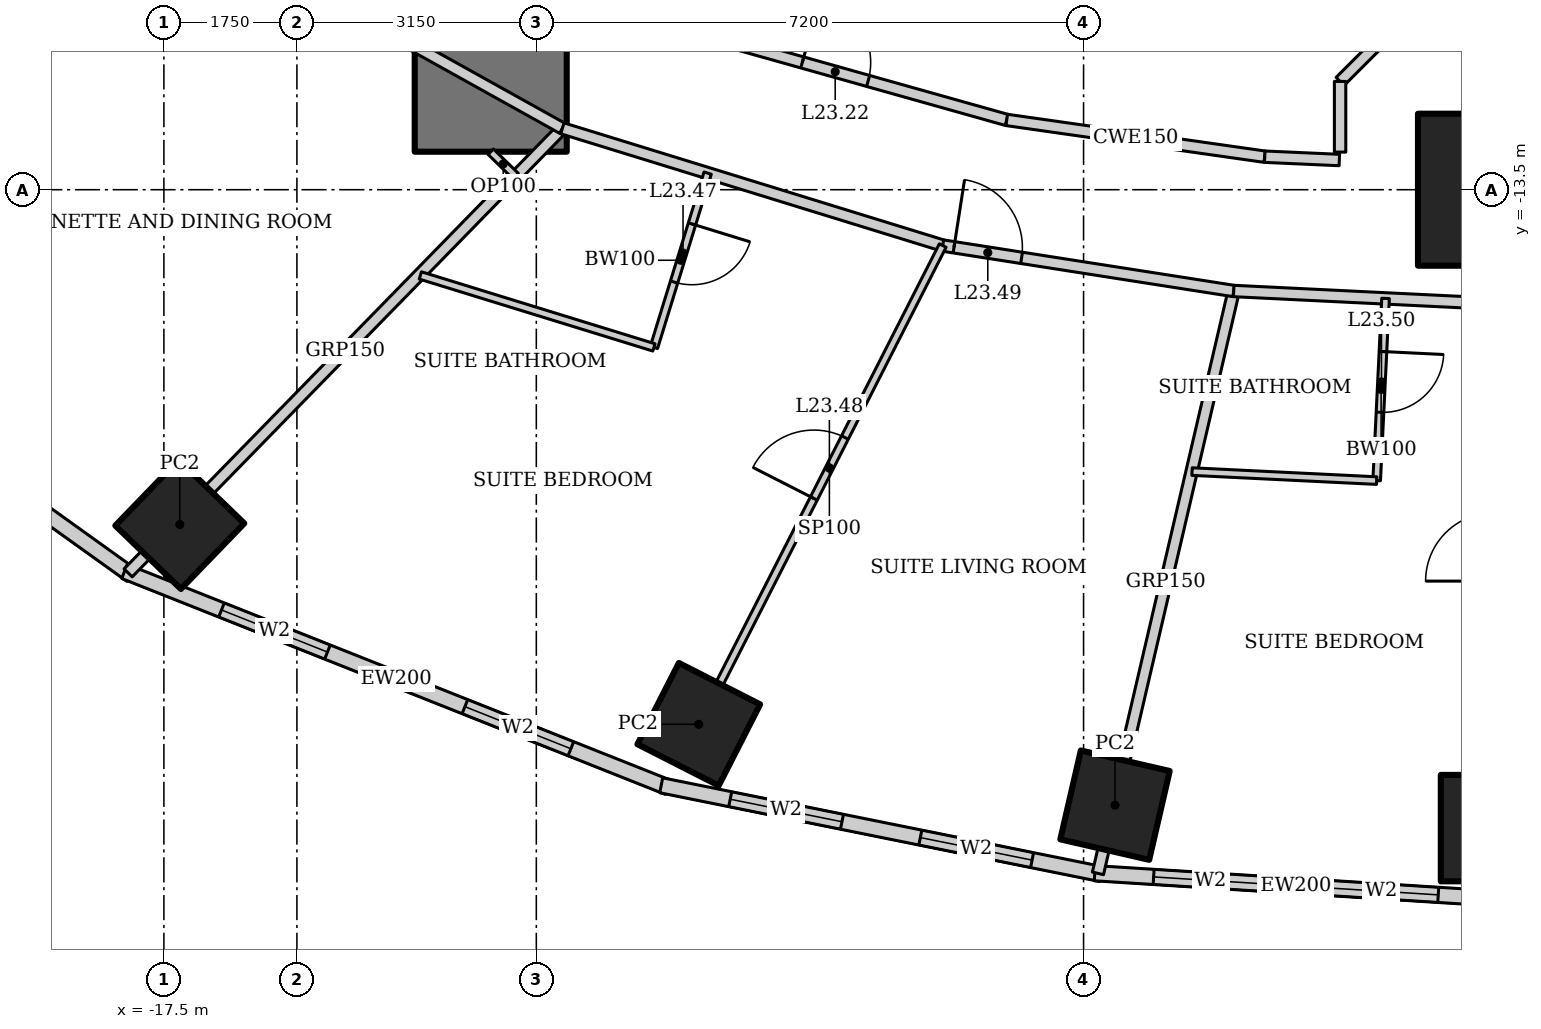
"""IFC4 building model, lengths in metres.
Left out: names, types, materials, properties, quantities, classifications, styles, units other than length and angle.
Written with IfcOpenShell. Run it as: python <this file> out.ifc"""

import sys

from ifc_helpers import new_model, si_unit, direction, frame, frame_2d, origin, origin_2d, place, context, subcontext, project, spatial, rectangle, hollow_rectangle, extrude, element, fill, save


model = new_model("IFC4")
c1 = context("Model", 3, precision=1e-05, world=origin(), true_north=direction((0.0, 1.0)))
c2 = subcontext(c1, "Body", "Model", "MODEL_VIEW")
j1 = project(units=[si_unit("LENGTHUNIT", "METRE"), si_unit("PLANEANGLEUNIT", "RADIAN")], contexts=[c1])
p1 = place(None, origin())
s1 = spatial("IfcSite", under=j1, at=p1, CompositionType="ELEMENT")
p2 = place(p1, origin())
s2 = spatial("IfcBuilding", under=s1, at=p2, CompositionType="ELEMENT")
p3 = place(p2, frame((0.0, 0.0, 98.2)))
s3 = spatial("IfcBuildingStorey", under=s2, at=p3, CompositionType="ELEMENT", Elevation=98.2)
p4 = place(p3, frame((0.0, -13.5, 0.0), z_axis=(0.0, 0.0, 1.0), x_axis=(1.0, 0.0, 0.0)))
e1 = element("IfcColumn", 1, at=p4, inside=s3, PredefinedType="COLUMN", context=c2, shape_type="SweptSolid", body=[
    extrude(hollow_rectangle(XDim=2.0, YDim=2.0, WallThickness=0.17, at=origin_2d()), origin(), (0.0, 0.0, 1.0), 3.6),
])
for number, where, z_axis, x_axis in (
    (2, (-17.291, -17.905, 0.0), (0.0, 0.0, 1.0), (0.695, 0.719, 0.0)),
    (3, (-10.463, -20.534, 0.0), (0.0, 0.0, 1.0), (0.454, 0.891, 0.0)),
    (4, (-4.986, -21.598, 0.0), (0.0, 0.0, 1.0), (0.225, 0.974, 0.0)),
):
    element("IfcColumn", number, at=place(p3, frame(where, z_axis=z_axis, x_axis=x_axis)), inside=s3, PredefinedType="COLUMN", context=c2, shape_type="SweptSolid", body=[
        extrude(hollow_rectangle(XDim=1.2, YDim=1.2, WallThickness=0.1, at=origin_2d()), origin(), (0.0, 0.0, 1.0), 3.6),
    ])
p5 = place(p3, frame((0.0, -21.9, 0.0), z_axis=(0.0, 0.0, 1.0), x_axis=(1.0, 0.0, 0.0)))
e5 = element("IfcColumn", 5, at=p5, inside=s3, PredefinedType="COLUMN", context=c2, shape_type="SweptSolid", body=[
    extrude(hollow_rectangle(XDim=1.4, YDim=1.4, WallThickness=0.1, at=origin_2d()), origin(), (0.0, 0.0, 1.0), 3.6),
])
p6 = place(p3, frame((-13.2, 13.0, 0.0), z_axis=(0.0, 0.0, 1.0), x_axis=(0.0, -1.0, 0.0)))
e6 = element("IfcWall", 6, at=p6, inside=s3, PredefinedType="SHEAR", context=c2, shape_type="SweptSolid", body=[
    extrude(rectangle(XDim=26.0, YDim=2.0, at=frame_2d((13.0, 0.0))), origin(), (0.0, 0.0, 1.0), 3.6),
])
p7 = place(p6, frame((12.1, 0.0, 0.0)))
e7 = element("IfcOpeningElement", 7, at=p7, cuts=e6, PredefinedType="OPENING", context=c2, shape_type="SweptSolid", body=[
    extrude(rectangle(XDim=1.8, YDim=2.1, at=frame_2d((0.9, 1.05))), frame((0.0, 1.01, 0.0), z_axis=(0.0, -1.0, 0.0), x_axis=(1.0, 0.0, 0.0)), (0.0, 0.0, 1.0), 2.02),
])
p8 = place(p3, frame((-24.482, -13.875, 0.0), z_axis=(0.0, 0.0, 1.0), x_axis=(0.812791321576, -0.582554948112, 0.0)))
e8 = element("IfcWall", 8, at=p8, inside=s3, PredefinedType="SOLIDWALL", context=c2, shape_type="SweptSolid", body=[
    extrude(rectangle(XDim=8.063, YDim=0.2, at=frame_2d((4.032, 0.0))), origin(), (0.0, 0.0, 1.0), 3.45),
])
p9 = place(p8, frame((1.466, 0.0, 0.5)))
e9 = element("IfcOpeningElement", 9, at=p9, cuts=e8, PredefinedType="OPENING", context=c2, shape_type="SweptSolid", body=[
    extrude(rectangle(XDim=1.5, YDim=2.2, at=frame_2d((0.75, 1.1))), frame((0.0, 0.11, 0.0), z_axis=(0.0, -1.0, 0.0), x_axis=(1.0, 0.0, 0.0)), (0.0, 0.0, 1.0), 0.22),
])
p10 = place(p8, frame((5.097, 0.0, 0.5)))
e10 = element("IfcOpeningElement", 10, at=p10, cuts=e8, PredefinedType="OPENING", context=c2, shape_type="SweptSolid", body=[
    extrude(rectangle(XDim=1.5, YDim=2.2, at=frame_2d((0.75, 1.1))), frame((0.0, 0.11, 0.0), z_axis=(0.0, -1.0, 0.0), x_axis=(1.0, 0.0, 0.0)), (0.0, 0.0, 1.0), 0.22),
])
p11 = place(p3, frame((-18.018, -18.523, 0.0), z_axis=(0.0, 0.0, 1.0), x_axis=(0.929358351251, -0.369178892895, 0.0)))
e11 = element("IfcWall", 11, at=p11, inside=s3, PredefinedType="SOLIDWALL", context=c2, shape_type="SweptSolid", body=[
    extrude(rectangle(XDim=7.692, YDim=0.2, at=frame_2d((3.846, 0.0))), origin(), (0.0, 0.0, 1.0), 3.45),
])
p12 = place(p11, frame((1.373, 0.0, 0.5)))
e12 = element("IfcOpeningElement", 12, at=p12, cuts=e11, PredefinedType="OPENING", context=c2, shape_type="SweptSolid", body=[
    extrude(rectangle(XDim=1.5, YDim=2.2, at=frame_2d((0.75, 1.1))), frame((0.0, 0.11, 0.0), z_axis=(0.0, -1.0, 0.0), x_axis=(1.0, 0.0, 0.0)), (0.0, 0.0, 1.0), 0.22),
])
p13 = place(p11, frame((4.819, 0.0, 0.5)))
e13 = element("IfcOpeningElement", 13, at=p13, cuts=e11, PredefinedType="OPENING", context=c2, shape_type="SweptSolid", body=[
    extrude(rectangle(XDim=1.5, YDim=2.2, at=frame_2d((0.75, 1.1))), frame((0.0, 0.11, 0.0), z_axis=(0.0, -1.0, 0.0), x_axis=(1.0, 0.0, 0.0)), (0.0, 0.0, 1.0), 0.22),
])
p14 = place(p3, frame((-10.957, -21.337, 0.0), z_axis=(0.0, 0.0, 1.0), x_axis=(0.980251657452, -0.197754110105, 0.0)))
e14 = element("IfcWall", 14, at=p14, inside=s3, PredefinedType="SOLIDWALL", context=c2, shape_type="SweptSolid", body=[
    extrude(rectangle(XDim=5.904, YDim=0.2, at=frame_2d((2.952, 0.0))), origin(), (0.0, 0.0, 1.0), 3.45),
])
p15 = place(p14, frame((0.926, 0.0, 0.5)))
e15 = element("IfcOpeningElement", 15, at=p15, cuts=e14, PredefinedType="OPENING", context=c2, shape_type="SweptSolid", body=[
    extrude(rectangle(XDim=1.5, YDim=2.2, at=frame_2d((0.75, 1.1))), frame((0.0, 0.11, 0.0), z_axis=(0.0, -1.0, 0.0), x_axis=(1.0, 0.0, 0.0)), (0.0, 0.0, 1.0), 0.22),
])
p16 = place(p14, frame((3.478, 0.0, 0.5)))
e16 = element("IfcOpeningElement", 16, at=p16, cuts=e14, PredefinedType="OPENING", context=c2, shape_type="SweptSolid", body=[
    extrude(rectangle(XDim=1.5, YDim=2.2, at=frame_2d((0.75, 1.1))), frame((0.0, 0.11, 0.0), z_axis=(0.0, -1.0, 0.0), x_axis=(1.0, 0.0, 0.0)), (0.0, 0.0, 1.0), 0.22),
])
p17 = place(p3, frame((-5.253, -22.493, 0.0), z_axis=(0.0, 0.0, 1.0), x_axis=(0.998018582375, -0.062919863585, 0.0)))
e17 = element("IfcWall", 17, at=p17, inside=s3, PredefinedType="SOLIDWALL", context=c2, shape_type="SweptSolid", body=[
    extrude(rectangle(XDim=5.304, YDim=0.2, at=frame_2d((2.652, 0.0))), origin(), (0.0, 0.0, 1.0), 3.45),
])
p18 = place(p17, frame((0.776, 0.0, 0.5)))
e18 = element("IfcOpeningElement", 18, at=p18, cuts=e17, PredefinedType="OPENING", context=c2, shape_type="SweptSolid", body=[
    extrude(rectangle(XDim=1.5, YDim=2.2, at=frame_2d((0.75, 1.1))), frame((0.0, 0.11, 0.0), z_axis=(0.0, -1.0, 0.0), x_axis=(1.0, 0.0, 0.0)), (0.0, 0.0, 1.0), 0.22),
])
p19 = place(p17, frame((3.028, 0.0, 0.5)))
e19 = element("IfcOpeningElement", 19, at=p19, cuts=e17, PredefinedType="OPENING", context=c2, shape_type="SweptSolid", body=[
    extrude(rectangle(XDim=1.5, YDim=2.2, at=frame_2d((0.75, 1.1))), frame((0.0, 0.11, 0.0), z_axis=(0.0, -1.0, 0.0), x_axis=(1.0, 0.0, 0.0)), (0.0, 0.0, 1.0), 0.22),
])
p20 = place(p3, frame((-17.97, -18.542, 0.0), z_axis=(0.0, 0.0, 1.0), x_axis=(0.698757291878, 0.715358823981, 0.0)))
e20 = element("IfcWall", 20, at=p20, inside=s3, PredefinedType="PARTITIONING", context=c2, shape_type="SweptSolid", body=[
    extrude(rectangle(XDim=8.177, YDim=0.15, at=frame_2d((4.088, 0.0))), origin(), (0.0, 0.0, 1.0), 2.528),
])
p21 = place(p3, frame((-5.211, -22.496, 0.0), z_axis=(0.0, 0.0, 1.0), x_axis=(0.227056984461, 0.973881474209, 0.0)))
e21 = element("IfcWall", 21, at=p21, inside=s3, PredefinedType="PARTITIONING", context=c2, shape_type="SweptSolid", body=[
    extrude(rectangle(XDim=7.869, YDim=0.15, at=frame_2d((3.934, 0.0))), origin(), (0.0, 0.0, 1.0), 2.767),
])
p22 = place(p3, frame((-17.299, -9.885, 0.0), z_axis=(0.0, 0.0, 1.0), x_axis=(0.873695910579, -0.486472461541, 0.0)))
e22 = element("IfcWall", 22, at=p22, inside=s3, PredefinedType="PARTITIONING", context=c2, shape_type="SweptSolid", body=[
    extrude(rectangle(XDim=5.771, YDim=0.15, at=frame_2d((2.885, 0.0))), origin(), (0.0, 0.0, 1.0), 3.45),
])
p23 = place(p3, frame((-12.257, -12.693, 0.0), z_axis=(0.0, 0.0, 1.0), x_axis=(0.955657956744, -0.294478980085, 0.0)))
e23 = element("IfcWall", 23, at=p23, inside=s3, PredefinedType="PARTITIONING", context=c2, shape_type="SweptSolid", body=[
    extrude(rectangle(XDim=5.236, YDim=0.15, at=frame_2d((2.618, 0.0))), origin(), (0.0, 0.0, 1.0), 3.45),
])
p24 = place(p3, frame((-7.253, -14.235, 0.0), z_axis=(0.0, 0.0, 1.0), x_axis=(0.988015036573, -0.154357660987, 0.0)))
e24 = element("IfcWall", 24, at=p24, inside=s3, PredefinedType="PARTITIONING", context=c2, shape_type="SweptSolid", body=[
    extrude(rectangle(XDim=3.875, YDim=0.15, at=frame_2d((1.938, 0.0))), origin(), (0.0, 0.0, 1.0), 3.45),
])
p25 = place(p24, frame((0.15, 0.0, 0.0)))
e25 = element("IfcOpeningElement", 25, at=p25, cuts=e24, PredefinedType="OPENING", context=c2, shape_type="SweptSolid", body=[
    extrude(rectangle(XDim=0.9, YDim=2.1, at=frame_2d((0.45, 1.05))), frame((0.0, 0.085, 0.0), z_axis=(0.0, -1.0, 0.0), x_axis=(1.0, 0.0, 0.0)), (0.0, 0.0, 1.0), 0.17),
])
p26 = place(p3, frame((-3.424, -14.833, 0.0), z_axis=(0.0, 0.0, 1.0), x_axis=(0.998809560203, -0.048779733975, 0.0)))
e26 = element("IfcWall", 26, at=p26, inside=s3, PredefinedType="PARTITIONING", context=c2, shape_type="SweptSolid", body=[
    extrude(rectangle(XDim=3.428, YDim=0.15, at=frame_2d((1.714, 0.0))), origin(), (0.0, 0.0, 1.0), 3.45),
])
p27 = place(p3, frame((-10.924, -11.312, 0.0), z_axis=(0.0, 0.0, 1.0), x_axis=(0.962643729928, -0.270771211967, 0.0)))
e27 = element("IfcWall", 27, at=p27, inside=s3, PredefinedType="PARTITIONING", context=c2, shape_type="SweptSolid", body=[
    extrude(rectangle(XDim=4.688, YDim=0.15, at=frame_2d((2.344, 0.0))), origin(), (0.0, 0.0, 1.0), 3.45),
])
p28 = place(p27, frame((1.894, 0.0, 0.0)))
e28 = element("IfcOpeningElement", 28, at=p28, cuts=e27, PredefinedType="OPENING", context=c2, shape_type="SweptSolid", body=[
    extrude(rectangle(XDim=0.9, YDim=2.1, at=frame_2d((0.45, 1.05))), frame((0.0, 0.085, 0.0), z_axis=(0.0, -1.0, 0.0), x_axis=(1.0, 0.0, 0.0)), (0.0, 0.0, 1.0), 0.17),
])
p29 = place(p3, frame((-6.411, -12.582, 0.0), z_axis=(0.0, 0.0, 1.0), x_axis=(0.990002114939, -0.14105251652, 0.0)))
e29 = element("IfcWall", 29, at=p29, inside=s3, PredefinedType="PARTITIONING", context=c2, shape_type="SweptSolid", body=[
    extrude(rectangle(XDim=3.429, YDim=0.15, at=frame_2d((1.714, 0.0))), origin(), (0.0, 0.0, 1.0), 3.45),
])
p30 = place(p3, frame((-23.171, -13.24, 0.0), z_axis=(0.0, 0.0, 1.0), x_axis=(0.868249806728, 0.496127275118, 0.0)))
e30 = element("IfcWall", 30, at=p30, inside=s3, PredefinedType="PARTITIONING", context=c2, shape_type="SweptSolid", body=[
    extrude(rectangle(XDim=6.763, YDim=0.1, at=frame_2d((3.381, 0.0))), origin(), (0.0, 0.0, 1.0), 2.693),
])
p31 = place(p30, frame((2.931, 0.0, 0.0)))
e31 = element("IfcOpeningElement", 31, at=p31, cuts=e30, PredefinedType="OPENING", context=c2, shape_type="SweptSolid", body=[
    extrude(rectangle(XDim=0.9, YDim=2.1, at=frame_2d((0.45, 1.05))), frame((0.0, 0.06, 0.0), z_axis=(0.0, -1.0, 0.0), x_axis=(1.0, 0.0, 0.0)), (0.0, 0.0, 1.0), 0.12),
])
p32 = place(p3, frame((-10.346, -13.281, 0.0), z_axis=(0.0, 0.0, 1.0), x_axis=(-0.294478957423, -0.955657963727, 0.0)))
e32 = element("IfcWall", 32, at=p32, inside=s3, PredefinedType="PARTITIONING", context=c2, shape_type="SweptSolid", body=[
    extrude(rectangle(XDim=2.4, YDim=0.1, at=frame_2d((1.2, 0.0))), origin(), (0.0, 0.0, 1.0), 3.45),
])
p33 = place(p32, frame((0.7, 0.0, 0.0)))
e33 = element("IfcOpeningElement", 33, at=p33, cuts=e32, PredefinedType="OPENING", context=c2, shape_type="SweptSolid", body=[
    extrude(rectangle(XDim=0.8, YDim=2.1, at=frame_2d((0.4, 1.05))), frame((0.0, 0.06, 0.0), z_axis=(0.0, -1.0, 0.0), x_axis=(1.0, 0.0, 0.0)), (0.0, 0.0, 1.0), 0.12),
])
p34 = place(p3, frame((-11.052, -15.575, 0.0), z_axis=(0.0, 0.0, 1.0), x_axis=(-0.955641033268, 0.294533895391, 0.0)))
e34 = element("IfcWall", 34, at=p34, inside=s3, PredefinedType="PARTITIONING", context=c2, shape_type="SweptSolid", body=[
    extrude(rectangle(XDim=3.216, YDim=0.1, at=frame_2d((1.608, 0.0))), origin(), (0.0, 0.0, 1.0), 3.45),
])
p35 = place(p3, frame((-10.236, -20.088, 0.0), z_axis=(0.0, 0.0, 1.0), x_axis=(0.453993694696, 0.89100489627, 0.0)))
e35 = element("IfcWall", 35, at=p35, inside=s3, PredefinedType="PARTITIONING", context=c2, shape_type="SweptSolid", body=[
    extrude(rectangle(XDim=6.57, YDim=0.1, at=frame_2d((3.285, 0.0))), origin(), (0.0, 0.0, 1.0), 2.528),
])
p36 = place(p35, frame((2.835, 0.0, 0.0)))
e36 = element("IfcOpeningElement", 36, at=p36, cuts=e35, PredefinedType="OPENING", context=c2, shape_type="SweptSolid", body=[
    extrude(rectangle(XDim=0.9, YDim=2.1, at=frame_2d((0.45, 1.05))), frame((0.0, 0.06, 0.0), z_axis=(0.0, -1.0, 0.0), x_axis=(1.0, 0.0, 0.0)), (0.0, 0.0, 1.0), 0.12),
])
p37 = place(p3, frame((-1.427, -14.93, 0.0), z_axis=(0.0, 0.0, 1.0), x_axis=(-0.048831470304, -0.998807032168, 0.0)))
e37 = element("IfcWall", 37, at=p37, inside=s3, PredefinedType="PARTITIONING", context=c2, shape_type="SweptSolid", body=[
    extrude(rectangle(XDim=2.4, YDim=0.1, at=frame_2d((1.2, 0.0))), origin(), (0.0, 0.0, 1.0), 3.45),
])
p38 = place(p37, frame((0.7, 0.0, 0.0)))
e38 = element("IfcOpeningElement", 38, at=p38, cuts=e37, PredefinedType="OPENING", context=c2, shape_type="SweptSolid", body=[
    extrude(rectangle(XDim=0.8, YDim=2.1, at=frame_2d((0.4, 1.05))), frame((0.0, 0.06, 0.0), z_axis=(0.0, -1.0, 0.0), x_axis=(1.0, 0.0, 0.0)), (0.0, 0.0, 1.0), 0.12),
])
p39 = place(p3, frame((-1.544, -17.327, 0.0), z_axis=(0.0, 0.0, 1.0), x_axis=(-0.998813899717, 0.048690797202, 0.0)))
e39 = element("IfcWall", 39, at=p39, inside=s3, PredefinedType="PARTITIONING", context=c2, shape_type="SweptSolid", body=[
    extrude(rectangle(XDim=2.432, YDim=0.1, at=frame_2d((1.216, 0.0))), origin(), (0.0, 0.0, 1.0), 3.45),
])
p40 = place(p3, frame((-13.2, -13.0, 0.0), z_axis=(0.0, 0.0, 1.0), x_axis=(0.715289751842, -0.698827998087, 0.0)))
e40 = element("IfcWall", 40, at=p40, inside=s3, PredefinedType="PARTITIONING", context=c2, shape_type="SweptSolid", body=[
    extrude(rectangle(XDim=0.46, YDim=0.1, at=frame_2d((0.23, 0.0))), origin(), (0.0, 0.0, 1.0), 3.45),
])
p41 = place(p3, frame((-3.016, -13.066, 0.0), z_axis=(0.0, 0.0, 1.0), x_axis=(0.999010128674, -0.044483286824, 0.0)))
e41 = element("IfcWall", 41, at=p41, inside=s3, PredefinedType="PARTITIONING", context=c2, shape_type="SweptSolid", body=[
    extrude(rectangle(XDim=0.982, YDim=0.15, at=frame_2d((0.491, 0.0))), origin(), (0.0, 0.0, 1.0), 3.45),
])
p42 = place(p3, frame((-2.025, -12.075, 0.0), z_axis=(0.0, 0.0, 1.0), x_axis=(0.707106781187, 0.707106781187, 0.0)))
e42 = element("IfcWall", 42, at=p42, inside=s3, PredefinedType="PARTITIONING", context=c2, shape_type="SweptSolid", body=[
    extrude(rectangle(XDim=0.849, YDim=0.15, at=frame_2d((0.425, 0.0))), origin(), (0.0, 0.0, 1.0), 3.45),
])
p43 = place(p3, frame((-2.025, -13.005, 0.0), z_axis=(0.0, 0.0, 1.0), x_axis=(0.0, 1.0, 0.0)))
e43 = element("IfcWall", 43, at=p43, inside=s3, PredefinedType="PARTITIONING", context=c2, shape_type="SweptSolid", body=[
    extrude(rectangle(XDim=0.93, YDim=0.15, at=frame_2d((0.465, 0.0))), origin(), (0.0, 0.0, 1.0), 2.749),
])
p44 = place(p12, origin())
e44 = element("IfcWindow", 44, at=p44, inside=s3, PartitioningType="SINGLE_PANEL", PredefinedType="WINDOW", context=c2, shape_type="SweptSolid", body=[
    extrude(rectangle(XDim=1.5, YDim=2.2, at=frame_2d((0.75, 1.1))), frame((0.0, 0.03, 0.0), z_axis=(0.0, -1.0, 0.0), x_axis=(1.0, 0.0, 0.0)), (0.0, 0.0, 1.0), 0.06),
])
fill(e12, e44)
p45 = place(p13, origin())
e45 = element("IfcWindow", 45, at=p45, inside=s3, PartitioningType="SINGLE_PANEL", PredefinedType="WINDOW", context=c2, shape_type="SweptSolid", body=[
    extrude(rectangle(XDim=1.5, YDim=2.2, at=frame_2d((0.75, 1.1))), frame((0.0, 0.03, 0.0), z_axis=(0.0, -1.0, 0.0), x_axis=(1.0, 0.0, 0.0)), (0.0, 0.0, 1.0), 0.06),
])
fill(e13, e45)
p46 = place(p15, origin())
e46 = element("IfcWindow", 46, at=p46, inside=s3, PartitioningType="SINGLE_PANEL", PredefinedType="WINDOW", context=c2, shape_type="SweptSolid", body=[
    extrude(rectangle(XDim=1.5, YDim=2.2, at=frame_2d((0.75, 1.1))), frame((0.0, 0.03, 0.0), z_axis=(0.0, -1.0, 0.0), x_axis=(1.0, 0.0, 0.0)), (0.0, 0.0, 1.0), 0.06),
])
fill(e15, e46)
p47 = place(p16, origin())
e47 = element("IfcWindow", 47, at=p47, inside=s3, PartitioningType="SINGLE_PANEL", PredefinedType="WINDOW", context=c2, shape_type="SweptSolid", body=[
    extrude(rectangle(XDim=1.5, YDim=2.2, at=frame_2d((0.75, 1.1))), frame((0.0, 0.03, 0.0), z_axis=(0.0, -1.0, 0.0), x_axis=(1.0, 0.0, 0.0)), (0.0, 0.0, 1.0), 0.06),
])
fill(e16, e47)
p48 = place(p18, origin())
e48 = element("IfcWindow", 48, at=p48, inside=s3, PartitioningType="SINGLE_PANEL", PredefinedType="WINDOW", context=c2, shape_type="SweptSolid", body=[
    extrude(rectangle(XDim=1.5, YDim=2.2, at=frame_2d((0.75, 1.1))), frame((0.0, 0.03, 0.0), z_axis=(0.0, -1.0, 0.0), x_axis=(1.0, 0.0, 0.0)), (0.0, 0.0, 1.0), 0.06),
])
fill(e18, e48)
p49 = place(p19, origin())
e49 = element("IfcWindow", 49, at=p49, inside=s3, PartitioningType="SINGLE_PANEL", PredefinedType="WINDOW", context=c2, shape_type="SweptSolid", body=[
    extrude(rectangle(XDim=1.5, YDim=2.2, at=frame_2d((0.75, 1.1))), frame((0.0, 0.03, 0.0), z_axis=(0.0, -1.0, 0.0), x_axis=(1.0, 0.0, 0.0)), (0.0, 0.0, 1.0), 0.06),
])
fill(e19, e49)
p50 = place(p28, origin())
e50 = element("IfcDoor", 50, at=p50, inside=s3, OperationType="SINGLE_SWING_LEFT", PredefinedType="DOOR", context=c2, shape_type="SweptSolid", body=[
    extrude(rectangle(XDim=0.9, YDim=2.1, at=frame_2d((0.45, 1.05))), frame((0.0, 0.025, 0.0), z_axis=(0.0, -1.0, 0.0), x_axis=(1.0, 0.0, 0.0)), (0.0, 0.0, 1.0), 0.05),
])
fill(e28, e50)
p51 = place(p33, origin())
e51 = element("IfcDoor", 51, at=p51, inside=s3, OperationType="SINGLE_SWING_LEFT", PredefinedType="DOOR", context=c2, shape_type="SweptSolid", body=[
    extrude(rectangle(XDim=0.8, YDim=2.1, at=frame_2d((0.4, 1.05))), frame((0.0, 0.025, 0.0), z_axis=(0.0, -1.0, 0.0), x_axis=(1.0, 0.0, 0.0)), (0.0, 0.0, 1.0), 0.05),
])
fill(e33, e51)
p52 = place(p36, origin())
e52 = element("IfcDoor", 52, at=p52, inside=s3, OperationType="SINGLE_SWING_LEFT", PredefinedType="DOOR", context=c2, shape_type="SweptSolid", body=[
    extrude(rectangle(XDim=0.9, YDim=2.1, at=frame_2d((0.45, 1.05))), frame((0.0, 0.025, 0.0), z_axis=(0.0, -1.0, 0.0), x_axis=(1.0, 0.0, 0.0)), (0.0, 0.0, 1.0), 0.05),
])
fill(e36, e52)
p53 = place(p25, origin())
e53 = element("IfcDoor", 53, at=p53, inside=s3, OperationType="SINGLE_SWING_LEFT", PredefinedType="DOOR", context=c2, shape_type="SweptSolid", body=[
    extrude(rectangle(XDim=0.9, YDim=2.1, at=frame_2d((0.45, 1.05))), frame((0.0, 0.025, 0.0), z_axis=(0.0, -1.0, 0.0), x_axis=(1.0, 0.0, 0.0)), (0.0, 0.0, 1.0), 0.05),
])
fill(e25, e53)
p54 = place(p38, origin())
e54 = element("IfcDoor", 54, at=p54, inside=s3, OperationType="SINGLE_SWING_LEFT", PredefinedType="DOOR", context=c2, shape_type="SweptSolid", body=[
    extrude(rectangle(XDim=0.8, YDim=2.1, at=frame_2d((0.4, 1.05))), frame((0.0, 0.025, 0.0), z_axis=(0.0, -1.0, 0.0), x_axis=(1.0, 0.0, 0.0)), (0.0, 0.0, 1.0), 0.05),
])
fill(e38, e54)
save(model, sys.argv[1])
